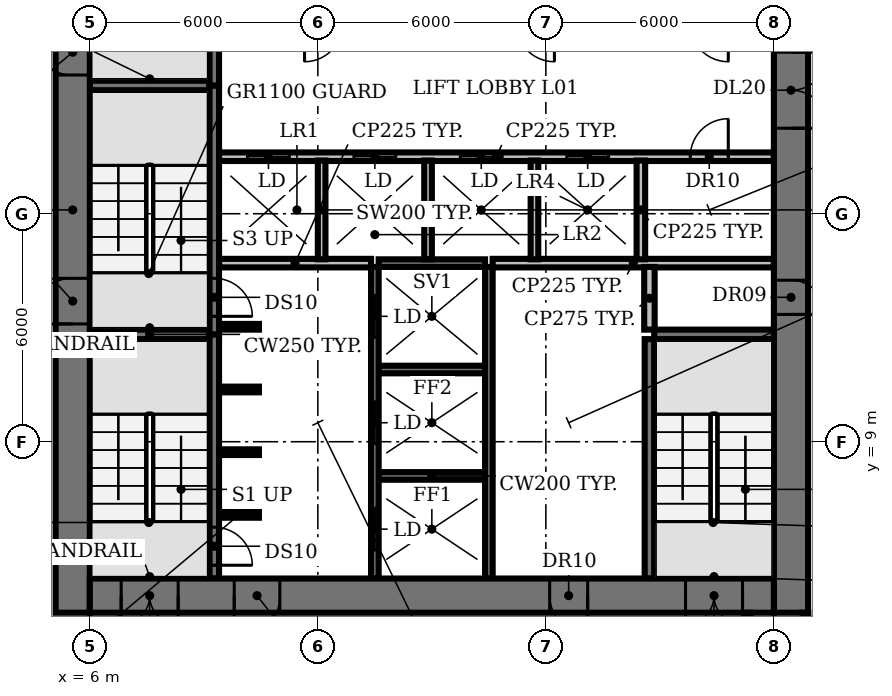
"""IFC4 building model, lengths in metres.
Left out: names, types, materials, properties, quantities, classifications, styles, units other than length and angle.
Written with IfcOpenShell. Run it as: python <this file> out.ifc"""

import sys

from ifc_helpers import new_model, si_unit, direction, frame, frame_2d, origin, place, context, subcontext, project, spatial, rectangle, extrude, element, fill, save


model = new_model("IFC4")
c1 = context("Model", 3, precision=1e-05, world=origin(), true_north=direction((0.0, 1.0)))
c2 = subcontext(c1, "Body", "Model", "MODEL_VIEW")
j1 = project(units=[si_unit("LENGTHUNIT", "METRE"), si_unit("PLANEANGLEUNIT", "RADIAN")], contexts=[c1])
p1 = place(None, origin())
s1 = spatial("IfcSite", under=j1, at=p1, CompositionType="ELEMENT")
p2 = place(p1, origin())
s2 = spatial("IfcBuilding", under=s1, at=p2, CompositionType="ELEMENT")
p3 = place(p2, frame((0.0, 0.0, 6.0)))
s3 = spatial("IfcBuildingStorey", under=s2, at=p3, CompositionType="ELEMENT", Elevation=6.0)
p4 = place(p3, frame((9.4, 7.075, 0.0), z_axis=(0.0, 0.0, 1.0), x_axis=(1.0, 0.0, 0.0)))
e1 = element("IfcWall", 1, at=p4, inside=s3, PredefinedType="SHEAR", context=c2, shape_type="SweptSolid", body=[
    extrude(rectangle(XDim=1.05, YDim=0.15, at=frame_2d((0.525, 0.0))), origin(), (0.0, 0.0, 1.0), 4.6),
])
p5 = place(p3, frame((13.6, 8.1, 0.0), z_axis=(0.0, 0.0, 1.0), x_axis=(1.0, 0.0, 0.0)))
e2 = element("IfcWall", 2, at=p5, inside=s3, PredefinedType="SHEAR", context=c2, shape_type="SweptSolid", body=[
    extrude(rectangle(XDim=2.8, YDim=0.2, at=frame_2d((1.4, 0.0))), origin(), (0.0, 0.0, 1.0), 4.6),
])
for number, where, z_axis, x_axis in (
    (3, (9.4, 8.725, 0.0), (0.0, 0.0, 1.0), (1.0, 0.0, 0.0)),
    (4, (9.4, 10.375, 0.0), (0.0, 0.0, 1.0), (1.0, 0.0, 0.0)),
):
    element("IfcWall", number, at=place(p3, frame(where, z_axis=z_axis, x_axis=x_axis)), inside=s3, PredefinedType="SHEAR", context=c2, shape_type="SweptSolid", body=[
        extrude(rectangle(XDim=1.05, YDim=0.15, at=frame_2d((0.525, 0.0))), origin(), (0.0, 0.0, 1.0), 4.6),
    ])
p6 = place(p3, frame((13.6, 10.9, 0.0), z_axis=(0.0, 0.0, 1.0), x_axis=(1.0, 0.0, 0.0)))
e5 = element("IfcWall", 5, at=p6, inside=s3, PredefinedType="SHEAR", context=c2, shape_type="SweptSolid", body=[
    extrude(rectangle(XDim=2.8, YDim=0.2, at=frame_2d((1.4, 0.0))), origin(), (0.0, 0.0, 1.0), 4.6),
])
for number, where, z_axis, x_axis in (
    (6, (6.0, 11.825, 0.0), (0.0, 0.0, 1.0), (1.0, 0.0, 0.0)),
    (7, (20.85, 11.825, 0.0), (0.0, 0.0, 1.0), (1.0, 0.0, 0.0)),
):
    element("IfcWall", number, at=place(p3, frame(where, z_axis=z_axis, x_axis=x_axis)), inside=s3, PredefinedType="SHEAR", context=c2, shape_type="SweptSolid", body=[
        extrude(rectangle(XDim=3.15, YDim=0.25, at=frame_2d((1.575, 0.0))), origin(), (0.0, 0.0, 1.0), 4.6),
    ])
p7 = place(p3, frame((9.4, 12.025, 0.0), z_axis=(0.0, 0.0, 1.0), x_axis=(1.0, 0.0, 0.0)))
e8 = element("IfcWall", 8, at=p7, inside=s3, PredefinedType="SHEAR", context=c2, shape_type="SweptSolid", body=[
    extrude(rectangle(XDim=1.05, YDim=0.15, at=frame_2d((0.525, 0.0))), origin(), (0.0, 0.0, 1.0), 4.6),
])
p8 = place(p3, frame((9.4, 13.7, 0.0), z_axis=(0.0, 0.0, 1.0), x_axis=(1.0, 0.0, 0.0)))
e9 = element("IfcWall", 9, at=p8, inside=s3, PredefinedType="PARTITIONING", context=c2, shape_type="SweptSolid", body=[
    extrude(rectangle(XDim=4.0, YDim=0.225, at=frame_2d((2.0, 0.0))), origin(), (0.0, 0.0, 1.0), 4.6),
])
p9 = place(p3, frame((13.6, 13.7, 0.0), z_axis=(0.0, 0.0, 1.0), x_axis=(1.0, 0.0, 0.0)))
e10 = element("IfcWall", 10, at=p9, inside=s3, PredefinedType="SHEAR", context=c2, shape_type="SweptSolid", body=[
    extrude(rectangle(XDim=2.8, YDim=0.2, at=frame_2d((1.4, 0.0))), origin(), (0.0, 0.0, 1.0), 4.6),
])
p10 = place(p3, frame((16.6, 13.7, 0.0), z_axis=(0.0, 0.0, 1.0), x_axis=(1.0, 0.0, 0.0)))
e11 = element("IfcWall", 11, at=p10, inside=s3, PredefinedType="PARTITIONING", context=c2, shape_type="SweptSolid", body=[
    extrude(rectangle(XDim=7.4, YDim=0.225, at=frame_2d((3.7, 0.0))), origin(), (0.0, 0.0, 1.0), 4.6),
])
p11 = place(p3, frame((9.4, 16.5, 0.0), z_axis=(0.0, 0.0, 1.0), x_axis=(1.0, 0.0, 0.0)))
e12 = element("IfcWall", 12, at=p11, inside=s3, PredefinedType="PARTITIONING", context=c2, shape_type="SweptSolid", body=[
    extrude(rectangle(XDim=14.6, YDim=0.225, at=frame_2d((7.3, 0.0))), origin(), (0.0, 0.0, 1.0), 4.6),
])
p12 = place(p11, frame((0.75, 0.0, 0.0)))
e13 = element("IfcOpeningElement", 13, at=p12, cuts=e12, PredefinedType="OPENING", context=c2, shape_type="SweptSolid", body=[
    extrude(rectangle(XDim=1.1, YDim=2.1, at=frame_2d((0.55, 1.05))), frame((0.0, 0.123, 0.0), z_axis=(0.0, -1.0, 0.0), x_axis=(1.0, 0.0, 0.0)), (0.0, 0.0, 1.0), 0.245),
])
p13 = place(p11, frame((3.55, 0.0, 0.0)))
e14 = element("IfcOpeningElement", 14, at=p13, cuts=e12, PredefinedType="OPENING", context=c2, shape_type="SweptSolid", body=[
    extrude(rectangle(XDim=1.1, YDim=2.1, at=frame_2d((0.55, 1.05))), frame((0.0, 0.123, 0.0), z_axis=(0.0, -1.0, 0.0), x_axis=(1.0, 0.0, 0.0)), (0.0, 0.0, 1.0), 0.245),
])
p14 = place(p11, frame((6.35, 0.0, 0.0)))
e15 = element("IfcOpeningElement", 15, at=p14, cuts=e12, PredefinedType="OPENING", context=c2, shape_type="SweptSolid", body=[
    extrude(rectangle(XDim=1.1, YDim=2.1, at=frame_2d((0.55, 1.05))), frame((0.0, 0.123, 0.0), z_axis=(0.0, -1.0, 0.0), x_axis=(1.0, 0.0, 0.0)), (0.0, 0.0, 1.0), 0.245),
])
p15 = place(p11, frame((9.15, 0.0, 0.0)))
e16 = element("IfcOpeningElement", 16, at=p15, cuts=e12, PredefinedType="OPENING", context=c2, shape_type="SweptSolid", body=[
    extrude(rectangle(XDim=1.1, YDim=2.1, at=frame_2d((0.55, 1.05))), frame((0.0, 0.123, 0.0), z_axis=(0.0, -1.0, 0.0), x_axis=(1.0, 0.0, 0.0)), (0.0, 0.0, 1.0), 0.245),
])
p16 = place(p11, frame((12.4, 0.0, 0.0)))
e17 = element("IfcOpeningElement", 17, at=p16, cuts=e12, PredefinedType="OPENING", context=c2, shape_type="SweptSolid", body=[
    extrude(rectangle(XDim=1.0, YDim=2.1, at=frame_2d((0.5, 1.05))), frame((0.0, 0.123, 0.0), z_axis=(0.0, -1.0, 0.0), x_axis=(1.0, 0.0, 0.0)), (0.0, 0.0, 1.0), 0.245),
])
p17 = place(p3, frame((6.0, 18.375, 0.0), z_axis=(0.0, 0.0, 1.0), x_axis=(1.0, 0.0, 0.0)))
e18 = element("IfcWall", 18, at=p17, inside=s3, PredefinedType="SHEAR", context=c2, shape_type="SweptSolid", body=[
    extrude(rectangle(XDim=3.15, YDim=0.25, at=frame_2d((1.575, 0.0))), origin(), (0.0, 0.0, 1.0), 4.6),
])
p18 = place(p3, frame((9.275, 11.825, 0.0), z_axis=(0.0, 0.0, 1.0), x_axis=(0.0, -1.0, 0.0)))
e19 = element("IfcWall", 19, at=p18, inside=s3, PredefinedType="SHEAR", context=c2, shape_type="SweptSolid", body=[
    extrude(rectangle(XDim=6.425, YDim=0.25, at=frame_2d((3.212, 0.0))), origin(), (0.0, 0.0, 1.0), 4.6),
])
p19 = place(p18, frame((5.075, 0.0, 0.0)))
e20 = element("IfcOpeningElement", 20, at=p19, cuts=e19, PredefinedType="OPENING", context=c2, shape_type="SweptSolid", body=[
    extrude(rectangle(XDim=1.0, YDim=2.1, at=frame_2d((0.5, 1.05))), frame((0.0, 0.135, 0.0), z_axis=(0.0, -1.0, 0.0), x_axis=(1.0, 0.0, 0.0)), (0.0, 0.0, 1.0), 0.27),
])
p20 = place(p3, frame((9.275, 18.375, 0.0), z_axis=(0.0, 0.0, 1.0), x_axis=(0.0, -1.0, 0.0)))
e21 = element("IfcWall", 21, at=p20, inside=s3, PredefinedType="SHEAR", context=c2, shape_type="SweptSolid", body=[
    extrude(rectangle(XDim=6.55, YDim=0.25, at=frame_2d((3.275, 0.0))), origin(), (0.0, 0.0, 1.0), 4.6),
])
p21 = place(p20, frame((5.075, 0.0, 0.0)))
e22 = element("IfcOpeningElement", 22, at=p21, cuts=e21, PredefinedType="OPENING", context=c2, shape_type="SweptSolid", body=[
    extrude(rectangle(XDim=1.0, YDim=2.1, at=frame_2d((0.5, 1.05))), frame((0.0, 0.135, 0.0), z_axis=(0.0, -1.0, 0.0), x_axis=(1.0, 0.0, 0.0)), (0.0, 0.0, 1.0), 0.27),
])
p22 = place(p3, frame((9.275, 18.375, 0.0), z_axis=(0.0, 0.0, 1.0), x_axis=(0.0, 1.0, 0.0)))
e23 = element("IfcWall", 23, at=p22, inside=s3, PredefinedType="SHEAR", context=c2, shape_type="SweptSolid", body=[
    extrude(rectangle(XDim=6.425, YDim=0.25, at=frame_2d((3.212, 0.0))), origin(), (0.0, 0.0, 1.0), 4.6),
])
p23 = place(p3, frame((12.1, 13.8, 0.0), z_axis=(0.0, 0.0, 1.0), x_axis=(0.0, 1.0, 0.0)))
e24 = element("IfcWall", 24, at=p23, inside=s3, PredefinedType="SOLIDWALL", context=c2, shape_type="SweptSolid", body=[
    extrude(rectangle(XDim=2.6, YDim=0.2, at=frame_2d((1.3, 0.0))), origin(), (0.0, 0.0, 1.0), 4.6),
])
p24 = place(p3, frame((13.5, 5.4, 0.0), z_axis=(0.0, 0.0, 1.0), x_axis=(0.0, 1.0, 0.0)))
e25 = element("IfcWall", 25, at=p24, inside=s3, PredefinedType="SHEAR", context=c2, shape_type="SweptSolid", body=[
    extrude(rectangle(XDim=8.2, YDim=0.2, at=frame_2d((4.1, 0.0))), origin(), (0.0, 0.0, 1.0), 4.6),
])
p25 = place(p24, frame((0.75, 0.0, 0.0)))
e26 = element("IfcOpeningElement", 26, at=p25, cuts=e25, PredefinedType="OPENING", context=c2, shape_type="SweptSolid", body=[
    extrude(rectangle(XDim=1.1, YDim=2.1, at=frame_2d((0.55, 1.05))), frame((0.0, 0.11, 0.0), z_axis=(0.0, -1.0, 0.0), x_axis=(1.0, 0.0, 0.0)), (0.0, 0.0, 1.0), 0.22),
])
p26 = place(p24, frame((3.55, 0.0, 0.0)))
e27 = element("IfcOpeningElement", 27, at=p26, cuts=e25, PredefinedType="OPENING", context=c2, shape_type="SweptSolid", body=[
    extrude(rectangle(XDim=1.1, YDim=2.1, at=frame_2d((0.55, 1.05))), frame((0.0, 0.11, 0.0), z_axis=(0.0, -1.0, 0.0), x_axis=(1.0, 0.0, 0.0)), (0.0, 0.0, 1.0), 0.22),
])
p27 = place(p24, frame((6.35, 0.0, 0.0)))
e28 = element("IfcOpeningElement", 28, at=p27, cuts=e25, PredefinedType="OPENING", context=c2, shape_type="SweptSolid", body=[
    extrude(rectangle(XDim=1.1, YDim=2.1, at=frame_2d((0.55, 1.05))), frame((0.0, 0.11, 0.0), z_axis=(0.0, -1.0, 0.0), x_axis=(1.0, 0.0, 0.0)), (0.0, 0.0, 1.0), 0.22),
])
p28 = place(p3, frame((14.9, 13.8, 0.0), z_axis=(0.0, 0.0, 1.0), x_axis=(0.0, 1.0, 0.0)))
e29 = element("IfcWall", 29, at=p28, inside=s3, PredefinedType="SOLIDWALL", context=c2, shape_type="SweptSolid", body=[
    extrude(rectangle(XDim=2.6, YDim=0.2, at=frame_2d((1.3, 0.0))), origin(), (0.0, 0.0, 1.0), 4.6),
])
p29 = place(p3, frame((16.5, 5.4, 0.0), z_axis=(0.0, 0.0, 1.0), x_axis=(0.0, 1.0, 0.0)))
e30 = element("IfcWall", 30, at=p29, inside=s3, PredefinedType="SHEAR", context=c2, shape_type="SweptSolid", body=[
    extrude(rectangle(XDim=8.2, YDim=0.2, at=frame_2d((4.1, 0.0))), origin(), (0.0, 0.0, 1.0), 4.6),
])
p30 = place(p3, frame((17.7, 13.8, 0.0), z_axis=(0.0, 0.0, 1.0), x_axis=(0.0, 1.0, 0.0)))
e31 = element("IfcWall", 31, at=p30, inside=s3, PredefinedType="SOLIDWALL", context=c2, shape_type="SweptSolid", body=[
    extrude(rectangle(XDim=2.6, YDim=0.2, at=frame_2d((1.3, 0.0))), origin(), (0.0, 0.0, 1.0), 4.6),
])
p31 = place(p3, frame((20.5, 13.8, 0.0), z_axis=(0.0, 0.0, 1.0), x_axis=(0.0, 1.0, 0.0)))
e32 = element("IfcWall", 32, at=p31, inside=s3, PredefinedType="PARTITIONING", context=c2, shape_type="SweptSolid", body=[
    extrude(rectangle(XDim=2.6, YDim=0.225, at=frame_2d((1.3, 0.0))), origin(), (0.0, 0.0, 1.0), 4.6),
])
p32 = place(p3, frame((20.725, 5.4, 0.0), z_axis=(0.0, 0.0, 1.0), x_axis=(0.0, 1.0, 0.0)))
e33 = element("IfcWall", 33, at=p32, inside=s3, PredefinedType="SHEAR", context=c2, shape_type="SweptSolid", body=[
    extrude(rectangle(XDim=6.3, YDim=0.25, at=frame_2d((3.15, 0.0))), origin(), (0.0, 0.0, 1.0), 4.6),
])
p33 = place(p3, frame((20.725, 11.95, 0.0), z_axis=(0.0, 0.0, 1.0), x_axis=(0.0, 1.0, 0.0)))
e34 = element("IfcWall", 34, at=p33, inside=s3, PredefinedType="PARTITIONING", context=c2, shape_type="SweptSolid", body=[
    extrude(rectangle(XDim=1.65, YDim=0.275, at=frame_2d((0.825, 0.0))), origin(), (0.0, 0.0, 1.0), 4.6),
])
p34 = place(p3, frame((5.55, 4.5, 0.0), z_axis=(0.0, 0.0, 1.0), x_axis=(0.0, 1.0, 0.0)))
e35 = element("IfcWall", 35, at=p34, inside=s3, PredefinedType="SHEAR", context=c2, shape_type="SweptSolid", body=[
    extrude(rectangle(XDim=21.2, YDim=0.9, at=frame_2d((10.6, 0.0))), origin(), (0.0, 0.0, 1.0), 4.6),
])
p35 = place(p34, frame((7.6, 0.0, 0.0)))
e36 = element("IfcOpeningElement", 36, at=p35, cuts=e35, PredefinedType="OPENING", context=c2, shape_type="SweptSolid", body=[
    extrude(rectangle(XDim=1.2, YDim=2.1, at=frame_2d((0.6, 1.05))), frame((0.0, 0.46, 0.0), z_axis=(0.0, -1.0, 0.0), x_axis=(1.0, 0.0, 0.0)), (0.0, 0.0, 1.0), 0.92),
])
p36 = place(p34, frame((14.15, 0.0, 0.0)))
e37 = element("IfcOpeningElement", 37, at=p36, cuts=e35, PredefinedType="OPENING", context=c2, shape_type="SweptSolid", body=[
    extrude(rectangle(XDim=1.2, YDim=2.1, at=frame_2d((0.6, 1.05))), frame((0.0, 0.46, 0.0), z_axis=(0.0, -1.0, 0.0), x_axis=(1.0, 0.0, 0.0)), (0.0, 0.0, 1.0), 0.92),
])
p37 = place(p3, frame((24.45, 25.7, 0.0), z_axis=(0.0, 0.0, 1.0), x_axis=(0.0, -1.0, 0.0)))
e38 = element("IfcWall", 38, at=p37, inside=s3, PredefinedType="SHEAR", context=c2, shape_type="SweptSolid", body=[
    extrude(rectangle(XDim=21.2, YDim=0.9, at=frame_2d((10.6, 0.0))), origin(), (0.0, 0.0, 1.0), 4.6),
])
p38 = place(p37, frame((12.45, 0.0, 0.0)))
e39 = element("IfcOpeningElement", 39, at=p38, cuts=e38, PredefinedType="OPENING", context=c2, shape_type="SweptSolid", body=[
    extrude(rectangle(XDim=0.9, YDim=2.1, at=frame_2d((0.45, 1.05))), frame((0.0, 0.46, 0.0), z_axis=(0.0, -1.0, 0.0), x_axis=(1.0, 0.0, 0.0)), (0.0, 0.0, 1.0), 0.92),
])
p39 = place(p37, frame((6.45, 0.0, 0.0)))
e40 = element("IfcOpeningElement", 40, at=p39, cuts=e38, PredefinedType="OPENING", context=c2, shape_type="SweptSolid", body=[
    extrude(rectangle(XDim=2.0, YDim=2.1, at=frame_2d((1.0, 1.05))), frame((0.0, 0.46, 0.0), z_axis=(0.0, -1.0, 0.0), x_axis=(1.0, 0.0, 0.0)), (0.0, 0.0, 1.0), 0.92),
])
p40 = place(p3, frame((24.0, 4.95, 0.0), z_axis=(0.0, 0.0, 1.0), x_axis=(-1.0, 0.0, 0.0)))
e41 = element("IfcWall", 41, at=p40, inside=s3, PredefinedType="SHEAR", context=c2, shape_type="SweptSolid", body=[
    extrude(rectangle(XDim=18.0, YDim=0.9, at=frame_2d((9.0, 0.0))), origin(), (0.0, 0.0, 1.0), 4.6),
])
p41 = place(p40, frame((15.675, 0.0, 0.0)))
e42 = element("IfcOpeningElement", 42, at=p41, cuts=e41, PredefinedType="OPENING", context=c2, shape_type="SweptSolid", body=[
    extrude(rectangle(XDim=1.5, YDim=2.1, at=frame_2d((0.75, 1.05))), frame((0.0, 0.46, 0.0), z_axis=(0.0, -1.0, 0.0), x_axis=(1.0, 0.0, 0.0)), (0.0, 0.0, 1.0), 0.92),
])
p42 = place(p40, frame((0.825, 0.0, 0.0)))
e43 = element("IfcOpeningElement", 43, at=p42, cuts=e41, PredefinedType="OPENING", context=c2, shape_type="SweptSolid", body=[
    extrude(rectangle(XDim=1.5, YDim=2.1, at=frame_2d((0.75, 1.05))), frame((0.0, 0.46, 0.0), z_axis=(0.0, -1.0, 0.0), x_axis=(1.0, 0.0, 0.0)), (0.0, 0.0, 1.0), 0.92),
])
p43 = place(p40, frame((13.0, 0.0, 0.0)))
e44 = element("IfcOpeningElement", 44, at=p43, cuts=e41, PredefinedType="OPENING", context=c2, shape_type="SweptSolid", body=[
    extrude(rectangle(XDim=1.2, YDim=2.1, at=frame_2d((0.6, 1.05))), frame((0.0, 0.46, 0.0), z_axis=(0.0, -1.0, 0.0), x_axis=(1.0, 0.0, 0.0)), (0.0, 0.0, 1.0), 0.92),
])
p44 = place(p40, frame((4.9, 0.0, 0.0)))
e45 = element("IfcOpeningElement", 45, at=p44, cuts=e41, PredefinedType="OPENING", context=c2, shape_type="SweptSolid", body=[
    extrude(rectangle(XDim=1.0, YDim=2.1, at=frame_2d((0.5, 1.05))), frame((0.0, 0.46, 0.0), z_axis=(0.0, -1.0, 0.0), x_axis=(1.0, 0.0, 0.0)), (0.0, 0.0, 1.0), 0.92),
])
for number, where, z_axis, x_axis in (
    (46, (23.32, 3.45, 0.0), (0.0, 0.0, 1.0), (0.0, 1.0, 0.0)),
    (47, (24.83, 3.45, 0.0), (0.0, 0.0, 1.0), (0.0, 1.0, 0.0)),
):
    element("IfcWall", number, at=place(p3, frame(where, z_axis=z_axis, x_axis=x_axis)), inside=s3, PredefinedType="PARTITIONING", context=c2, shape_type="SweptSolid", body=[
        extrude(rectangle(XDim=1.05, YDim=0.15, at=frame_2d((0.525, 0.0))), origin(), (0.0, 0.0, 1.0), 3.18),
    ])
p45 = place(p12, origin())
e48 = element("IfcDoor", 48, at=p45, inside=s3, OperationType="DOUBLE_DOOR_SLIDING", PredefinedType="DOOR", context=c2, shape_type="SweptSolid", body=[
    extrude(rectangle(XDim=1.1, YDim=2.1, at=frame_2d((0.55, 1.05))), frame((0.0, 0.025, 0.0), z_axis=(0.0, -1.0, 0.0), x_axis=(1.0, 0.0, 0.0)), (0.0, 0.0, 1.0), 0.05),
])
fill(e13, e48)
p46 = place(p13, origin())
e49 = element("IfcDoor", 49, at=p46, inside=s3, OperationType="DOUBLE_DOOR_SLIDING", PredefinedType="DOOR", context=c2, shape_type="SweptSolid", body=[
    extrude(rectangle(XDim=1.1, YDim=2.1, at=frame_2d((0.55, 1.05))), frame((0.0, 0.025, 0.0), z_axis=(0.0, -1.0, 0.0), x_axis=(1.0, 0.0, 0.0)), (0.0, 0.0, 1.0), 0.05),
])
fill(e14, e49)
p47 = place(p14, origin())
e50 = element("IfcDoor", 50, at=p47, inside=s3, OperationType="DOUBLE_DOOR_SLIDING", PredefinedType="DOOR", context=c2, shape_type="SweptSolid", body=[
    extrude(rectangle(XDim=1.1, YDim=2.1, at=frame_2d((0.55, 1.05))), frame((0.0, 0.025, 0.0), z_axis=(0.0, -1.0, 0.0), x_axis=(1.0, 0.0, 0.0)), (0.0, 0.0, 1.0), 0.05),
])
fill(e15, e50)
p48 = place(p15, origin())
e51 = element("IfcDoor", 51, at=p48, inside=s3, OperationType="DOUBLE_DOOR_SLIDING", PredefinedType="DOOR", context=c2, shape_type="SweptSolid", body=[
    extrude(rectangle(XDim=1.1, YDim=2.1, at=frame_2d((0.55, 1.05))), frame((0.0, 0.025, 0.0), z_axis=(0.0, -1.0, 0.0), x_axis=(1.0, 0.0, 0.0)), (0.0, 0.0, 1.0), 0.05),
])
fill(e16, e51)
p49 = place(p16, origin())
e52 = element("IfcDoor", 52, at=p49, inside=s3, OperationType="SINGLE_SWING_RIGHT", PredefinedType="DOOR", context=c2, shape_type="SweptSolid", body=[
    extrude(rectangle(XDim=1.0, YDim=2.1, at=frame_2d((0.5, 1.05))), frame((0.0, 0.025, 0.0), z_axis=(0.0, -1.0, 0.0), x_axis=(1.0, 0.0, 0.0)), (0.0, 0.0, 1.0), 0.05),
])
fill(e17, e52)
p50 = place(p19, origin())
e53 = element("IfcDoor", 53, at=p50, inside=s3, OperationType="SINGLE_SWING_RIGHT", PredefinedType="DOOR", context=c2, shape_type="SweptSolid", body=[
    extrude(rectangle(XDim=1.0, YDim=2.1, at=frame_2d((0.5, 1.05))), frame((0.0, 0.025, 0.0), z_axis=(0.0, -1.0, 0.0), x_axis=(1.0, 0.0, 0.0)), (0.0, 0.0, 1.0), 0.05),
])
fill(e20, e53)
p51 = place(p21, origin())
e54 = element("IfcDoor", 54, at=p51, inside=s3, OperationType="SINGLE_SWING_RIGHT", PredefinedType="DOOR", context=c2, shape_type="SweptSolid", body=[
    extrude(rectangle(XDim=1.0, YDim=2.1, at=frame_2d((0.5, 1.05))), frame((0.0, 0.025, 0.0), z_axis=(0.0, -1.0, 0.0), x_axis=(1.0, 0.0, 0.0)), (0.0, 0.0, 1.0), 0.05),
])
fill(e22, e54)
p52 = place(p25, origin())
e55 = element("IfcDoor", 55, at=p52, inside=s3, OperationType="DOUBLE_DOOR_SLIDING", PredefinedType="DOOR", context=c2, shape_type="SweptSolid", body=[
    extrude(rectangle(XDim=1.1, YDim=2.1, at=frame_2d((0.55, 1.05))), frame((0.0, 0.025, 0.0), z_axis=(0.0, -1.0, 0.0), x_axis=(1.0, 0.0, 0.0)), (0.0, 0.0, 1.0), 0.05),
])
fill(e26, e55)
p53 = place(p26, origin())
e56 = element("IfcDoor", 56, at=p53, inside=s3, OperationType="DOUBLE_DOOR_SLIDING", PredefinedType="DOOR", context=c2, shape_type="SweptSolid", body=[
    extrude(rectangle(XDim=1.1, YDim=2.1, at=frame_2d((0.55, 1.05))), frame((0.0, 0.025, 0.0), z_axis=(0.0, -1.0, 0.0), x_axis=(1.0, 0.0, 0.0)), (0.0, 0.0, 1.0), 0.05),
])
fill(e27, e56)
p54 = place(p27, origin())
e57 = element("IfcDoor", 57, at=p54, inside=s3, OperationType="DOUBLE_DOOR_SLIDING", PredefinedType="DOOR", context=c2, shape_type="SweptSolid", body=[
    extrude(rectangle(XDim=1.1, YDim=2.1, at=frame_2d((0.55, 1.05))), frame((0.0, 0.025, 0.0), z_axis=(0.0, -1.0, 0.0), x_axis=(1.0, 0.0, 0.0)), (0.0, 0.0, 1.0), 0.05),
])
fill(e28, e57)
p55 = place(p35, origin())
e58 = element("IfcDoor", 58, at=p55, inside=s3, OperationType="SINGLE_SWING_LEFT", PredefinedType="DOOR", context=c2, shape_type="SweptSolid", body=[
    extrude(rectangle(XDim=1.2, YDim=2.1, at=frame_2d((0.6, 1.05))), frame((0.0, 0.025, 0.0), z_axis=(0.0, -1.0, 0.0), x_axis=(1.0, 0.0, 0.0)), (0.0, 0.0, 1.0), 0.05),
])
fill(e36, e58)
p56 = place(p36, origin())
e59 = element("IfcDoor", 59, at=p56, inside=s3, OperationType="SINGLE_SWING_RIGHT", PredefinedType="DOOR", context=c2, shape_type="SweptSolid", body=[
    extrude(rectangle(XDim=1.2, YDim=2.1, at=frame_2d((0.6, 1.05))), frame((0.0, 0.025, 0.0), z_axis=(0.0, -1.0, 0.0), x_axis=(1.0, 0.0, 0.0)), (0.0, 0.0, 1.0), 0.05),
])
fill(e37, e59)
p57 = place(p38, origin())
e60 = element("IfcDoor", 60, at=p57, inside=s3, OperationType="SINGLE_SWING_RIGHT", PredefinedType="DOOR", context=c2, shape_type="SweptSolid", body=[
    extrude(rectangle(XDim=0.9, YDim=2.1, at=frame_2d((0.45, 1.05))), frame((0.0, -0.39, 0.0), z_axis=(0.0, -1.0, 0.0), x_axis=(1.0, 0.0, 0.0)), (0.0, 0.0, 1.0), 0.05),
])
fill(e39, e60)
p58 = place(p39, origin())
e61 = element("IfcDoor", 61, at=p58, inside=s3, OperationType="DOUBLE_DOOR_SINGLE_SWING", PredefinedType="DOOR", context=c2, shape_type="SweptSolid", body=[
    extrude(rectangle(XDim=2.0, YDim=2.1, at=frame_2d((1.0, 1.05))), frame((0.0, 0.025, 0.0), z_axis=(0.0, -1.0, 0.0), x_axis=(1.0, 0.0, 0.0)), (0.0, 0.0, 1.0), 0.05),
])
fill(e40, e61)
p59 = place(p41, origin())
e62 = element("IfcDoor", 62, at=p59, inside=s3, OperationType="DOUBLE_DOOR_SINGLE_SWING", PredefinedType="DOOR", context=c2, shape_type="SweptSolid", body=[
    extrude(rectangle(XDim=1.5, YDim=2.1, at=frame_2d((0.75, 1.05))), frame((0.0, 0.025, 0.0), z_axis=(0.0, -1.0, 0.0), x_axis=(1.0, 0.0, 0.0)), (0.0, 0.0, 1.0), 0.05),
])
fill(e42, e62)
p60 = place(p42, origin())
e63 = element("IfcDoor", 63, at=p60, inside=s3, OperationType="DOUBLE_DOOR_SINGLE_SWING", PredefinedType="DOOR", context=c2, shape_type="SweptSolid", body=[
    extrude(rectangle(XDim=1.5, YDim=2.1, at=frame_2d((0.75, 1.05))), frame((0.0, 0.025, 0.0), z_axis=(0.0, -1.0, 0.0), x_axis=(1.0, 0.0, 0.0)), (0.0, 0.0, 1.0), 0.05),
])
fill(e43, e63)
p61 = place(p43, origin())
e64 = element("IfcDoor", 64, at=p61, inside=s3, OperationType="SINGLE_SWING_RIGHT", PredefinedType="DOOR", context=c2, shape_type="SweptSolid", body=[
    extrude(rectangle(XDim=1.2, YDim=2.1, at=frame_2d((0.6, 1.05))), frame((0.0, 0.025, 0.0), z_axis=(0.0, -1.0, 0.0), x_axis=(1.0, 0.0, 0.0)), (0.0, 0.0, 1.0), 0.05),
])
fill(e44, e64)
p62 = place(p44, origin())
e65 = element("IfcDoor", 65, at=p62, inside=s3, OperationType="SINGLE_SWING_LEFT", PredefinedType="DOOR", context=c2, shape_type="SweptSolid", body=[
    extrude(rectangle(XDim=1.0, YDim=2.1, at=frame_2d((0.5, 1.05))), frame((0.0, -0.39, 0.0), z_axis=(0.0, -1.0, 0.0), x_axis=(1.0, 0.0, 0.0)), (0.0, 0.0, 1.0), 0.05),
])
fill(e45, e65)
save(model, sys.argv[1])
